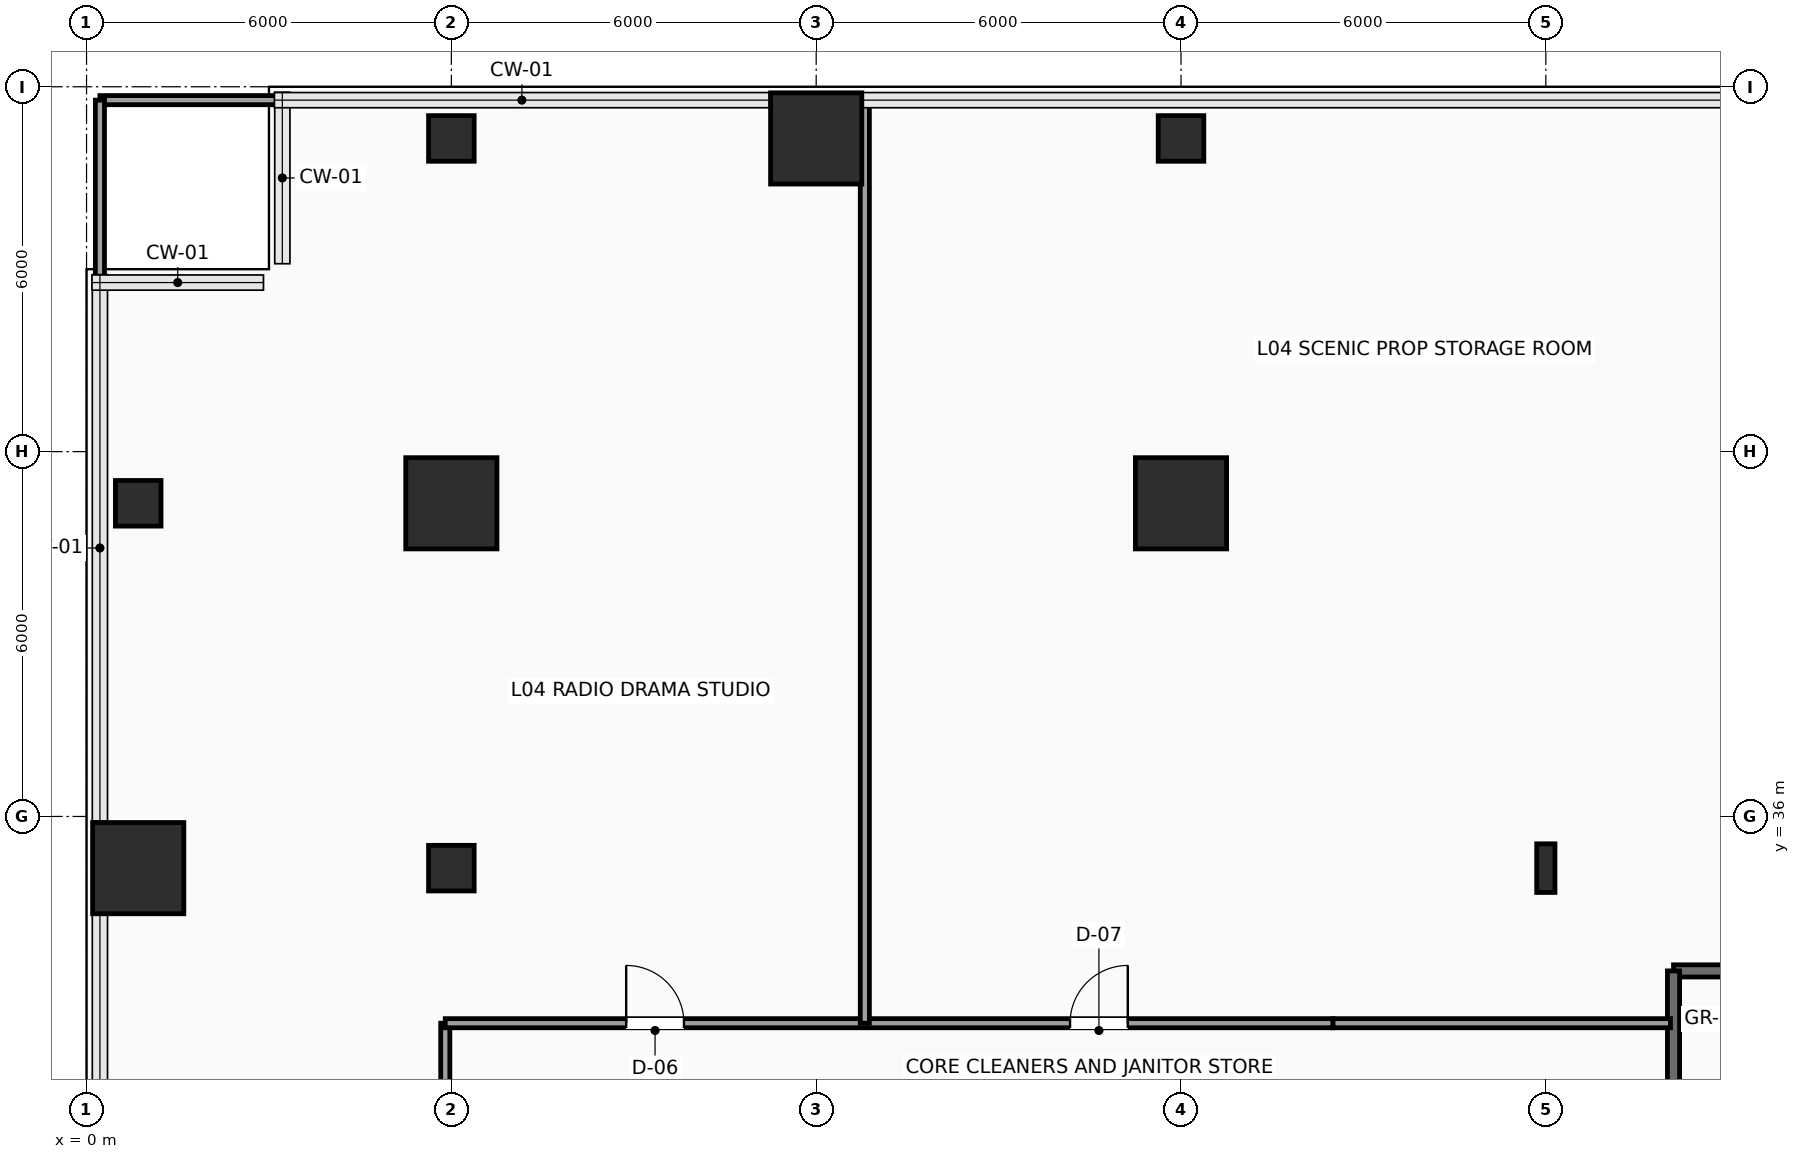
"""IFC4 building model, lengths in metres.
Left out: names, types, materials, properties, quantities, classifications, styles, units other than length and angle.
Written with IfcOpenShell. Run it as: python <this file> out.ifc"""

import sys

from ifc_helpers import new_model, si_unit, direction, frame, frame_2d, origin, origin_2d, place, context, subcontext, project, spatial, rectangle, hollow_rectangle, i_section, extrude, element, fill, save


model = new_model("IFC4")
c1 = context("Model", 3, precision=1e-05, world=origin(), true_north=direction((0.0, 1.0)))
c2 = subcontext(c1, "Body", "Model", "MODEL_VIEW")
j1 = project(units=[si_unit("LENGTHUNIT", "METRE"), si_unit("PLANEANGLEUNIT", "RADIAN")], contexts=[c1])
p1 = place(None, origin())
s1 = spatial("IfcSite", under=j1, at=p1, CompositionType="ELEMENT")
p2 = place(p1, origin())
s2 = spatial("IfcBuilding", under=s1, at=p2, CompositionType="ELEMENT")
p3 = place(p2, frame((0.0, 0.0, 21.9)))
s3 = spatial("IfcBuildingStorey", under=s2, at=p3, CompositionType="ELEMENT", Elevation=21.9)
p4 = place(p3, frame((0.85, 35.15, 0.0), z_axis=(0.0, 0.0, 1.0), x_axis=(1.0, 0.0, 0.0)))
e1 = element("IfcColumn", 1, at=p4, inside=s3, PredefinedType="COLUMN", context=c2, shape_type="SweptSolid", body=[
    extrude(rectangle(XDim=1.5, YDim=1.5, at=origin_2d()), origin(), (0.0, 0.0, 1.0), 5.7),
])
p5 = place(p3, frame((0.85, 41.15, 0.0), z_axis=(0.0, 0.0, 1.0), x_axis=(1.0, 0.0, 0.0)))
e2 = element("IfcColumn", 2, at=p5, inside=s3, PredefinedType="COLUMN", context=c2, shape_type="SweptSolid", body=[
    extrude(hollow_rectangle(XDim=0.75, YDim=0.75, WallThickness=0.035, InnerFilletRadius=0.035, OuterFilletRadius=0.05, at=origin_2d()), origin(), (0.0, 0.0, 1.0), 5.7),
])
p6 = place(p3, frame((6.0, 35.15, 0.0), z_axis=(0.0, 0.0, 1.0), x_axis=(1.0, 0.0, 0.0)))
e3 = element("IfcColumn", 3, at=p6, inside=s3, PredefinedType="COLUMN", context=c2, shape_type="SweptSolid", body=[
    extrude(hollow_rectangle(XDim=0.75, YDim=0.75, WallThickness=0.035, InnerFilletRadius=0.035, OuterFilletRadius=0.05, at=origin_2d()), origin(), (0.0, 0.0, 1.0), 5.35),
])
p7 = place(p3, frame((6.0, 41.15, 0.0), z_axis=(0.0, 0.0, 1.0), x_axis=(1.0, 0.0, 0.0)))
e4 = element("IfcColumn", 4, at=p7, inside=s3, PredefinedType="COLUMN", context=c2, shape_type="SweptSolid", body=[
    extrude(rectangle(XDim=1.5, YDim=1.5, at=origin_2d()), origin(), (0.0, 0.0, 1.0), 5.35),
])
p8 = place(p3, frame((6.0, 47.15, 0.0), z_axis=(0.0, 0.0, 1.0), x_axis=(1.0, 0.0, 0.0)))
e5 = element("IfcColumn", 5, at=p8, inside=s3, PredefinedType="COLUMN", context=c2, shape_type="SweptSolid", body=[
    extrude(hollow_rectangle(XDim=0.75, YDim=0.75, WallThickness=0.035, InnerFilletRadius=0.035, OuterFilletRadius=0.05, at=origin_2d()), origin(), (0.0, 0.0, 1.0), 5.7),
])
p9 = place(p3, frame((12.0, 47.15, 0.0), z_axis=(0.0, 0.0, 1.0), x_axis=(1.0, 0.0, 0.0)))
e6 = element("IfcColumn", 6, at=p9, inside=s3, PredefinedType="COLUMN", context=c2, shape_type="SweptSolid", body=[
    extrude(rectangle(XDim=1.5, YDim=1.5, at=origin_2d()), origin(), (0.0, 0.0, 1.0), 5.7),
])
p10 = place(p3, frame((18.0, 41.15, 0.0), z_axis=(0.0, 0.0, 1.0), x_axis=(1.0, 0.0, 0.0)))
e7 = element("IfcColumn", 7, at=p10, inside=s3, PredefinedType="COLUMN", context=c2, shape_type="SweptSolid", body=[
    extrude(rectangle(XDim=1.5, YDim=1.5, at=origin_2d()), origin(), (0.0, 0.0, 1.0), 5.35),
])
p11 = place(p3, frame((18.0, 47.15, 0.0), z_axis=(0.0, 0.0, 1.0), x_axis=(1.0, 0.0, 0.0)))
e8 = element("IfcColumn", 8, at=p11, inside=s3, PredefinedType="COLUMN", context=c2, shape_type="SweptSolid", body=[
    extrude(hollow_rectangle(XDim=0.75, YDim=0.75, WallThickness=0.035, InnerFilletRadius=0.035, OuterFilletRadius=0.05, at=origin_2d()), origin(), (0.0, 0.0, 1.0), 5.7),
])
p12 = place(p3, frame((24.0, 35.15, 0.0), z_axis=(0.0, 0.0, 1.0), x_axis=(1.0, 0.0, 0.0)))
e9 = element("IfcColumn", 9, at=p12, inside=s3, PredefinedType="COLUMN", context=c2, shape_type="SweptSolid", body=[
    extrude(i_section(OverallWidth=0.3, OverallDepth=0.8, WebThickness=0.018, FlangeThickness=0.033, FilletRadius=0.03, at=origin_2d()), origin(), (0.0, 0.0, 1.0), 5.35),
])
p13 = place(p3, frame((26.1, 33.46, 0.0), z_axis=(0.0, 0.0, 1.0), x_axis=(1.0, 0.0, 0.0)))
e10 = element("IfcWall", 10, at=p13, inside=s3, PredefinedType="SHEAR", context=c2, shape_type="SweptSolid", body=[
    extrude(rectangle(XDim=9.05, YDim=0.2, at=frame_2d((4.525, 0.0))), origin(), (0.0, 0.0, 1.0), 5.35),
])
p14 = place(p3, frame((26.1, 29.7, 0.0), z_axis=(0.0, 0.0, 1.0), x_axis=(0.0, 1.0, 0.0)))
e11 = element("IfcWall", 11, at=p14, inside=s3, PredefinedType="SHEAR", context=c2, shape_type="SweptSolid", body=[
    extrude(rectangle(XDim=3.76, YDim=0.2, at=frame_2d((1.88, 0.0))), origin(), (0.0, 0.0, 1.0), 5.35),
])
p15 = place(p3, frame((5.9, 30.2, 0.0), z_axis=(0.0, 0.0, 1.0), x_axis=(0.0, 1.0, 0.0)))
e12 = element("IfcWall", 12, at=p15, inside=s3, PredefinedType="PARTITIONING", context=c2, shape_type="SweptSolid", body=[
    extrude(rectangle(XDim=2.4, YDim=0.15, at=frame_2d((1.2, 0.0))), origin(), (0.0, 0.0, 1.0), 4.442),
])
p16 = place(p3, frame((5.9, 32.6, 0.0), z_axis=(0.0, 0.0, 1.0), x_axis=(1.0, 0.0, 0.0)))
e13 = element("IfcWall", 13, at=p16, inside=s3, PredefinedType="PARTITIONING", context=c2, shape_type="SweptSolid", body=[
    extrude(rectangle(XDim=14.6, YDim=0.15, at=frame_2d((7.3, 0.0))), origin(), (0.0, 0.0, 1.0), 5.35),
])
p17 = place(p16, frame((2.975, 0.0, 0.0)))
e14 = element("IfcOpeningElement", 14, at=p17, cuts=e13, PredefinedType="OPENING", context=c2, shape_type="SweptSolid", body=[
    extrude(rectangle(XDim=0.95, YDim=2.15, at=frame_2d((0.475, 1.075))), frame((0.0, 0.085, 0.0), z_axis=(0.0, -1.0, 0.0), x_axis=(1.0, 0.0, 0.0)), (0.0, 0.0, 1.0), 0.17),
])
p18 = place(p16, frame((10.275, 0.0, 0.0)))
e15 = element("IfcOpeningElement", 15, at=p18, cuts=e13, PredefinedType="OPENING", context=c2, shape_type="SweptSolid", body=[
    extrude(rectangle(XDim=0.95, YDim=2.15, at=frame_2d((0.475, 1.075))), frame((0.0, 0.085, 0.0), z_axis=(0.0, -1.0, 0.0), x_axis=(1.0, 0.0, 0.0)), (0.0, 0.0, 1.0), 0.17),
])
p19 = place(p3, frame((20.5, 32.6, 0.0), z_axis=(0.0, 0.0, 1.0), x_axis=(1.0, 0.0, 0.0)))
e16 = element("IfcWall", 16, at=p19, inside=s3, PredefinedType="PARTITIONING", context=c2, shape_type="SweptSolid", body=[
    extrude(rectangle(XDim=5.55, YDim=0.15, at=frame_2d((2.775, 0.0))), origin(), (0.0, 0.0, 1.0), 5.35),
])
p20 = place(p3, frame((0.22, 47.78, 0.0), z_axis=(0.0, 0.0, 1.0), x_axis=(1.0, 0.0, 0.0)))
e17 = element("IfcWall", 17, at=p20, inside=s3, PredefinedType="PARTITIONING", context=c2, shape_type="SweptSolid", body=[
    extrude(rectangle(XDim=12.58, YDim=0.15, at=frame_2d((6.29, 0.0))), origin(), (0.0, 0.0, 1.0), 5.35),
])
for number, where, z_axis, x_axis in (
    (18, (0.22, 32.6, 0.0), (0.0, 0.0, 1.0), (0.0, 1.0, 0.0)),
    (19, (12.8, 32.6, 0.0), (0.0, 0.0, 1.0), (0.0, 1.0, 0.0)),
):
    element("IfcWall", number, at=place(p3, frame(where, z_axis=z_axis, x_axis=x_axis)), inside=s3, PredefinedType="PARTITIONING", context=c2, shape_type="SweptSolid", body=[
        extrude(rectangle(XDim=15.18, YDim=0.15, at=frame_2d((7.59, 0.0))), origin(), (0.0, 0.0, 1.0), 5.35),
    ])
p21 = place(p17, origin())
e20 = element("IfcDoor", 20, at=p21, inside=s3, OperationType="SINGLE_SWING_LEFT", PredefinedType="DOOR", context=c2, shape_type="SweptSolid", body=[
    extrude(rectangle(XDim=0.95, YDim=2.15, at=frame_2d((0.475, 1.075))), frame((0.0, 0.025, 0.0), z_axis=(0.0, -1.0, 0.0), x_axis=(1.0, 0.0, 0.0)), (0.0, 0.0, 1.0), 0.05),
])
fill(e14, e20)
p22 = place(p18, origin())
e21 = element("IfcDoor", 21, at=p22, inside=s3, OperationType="SINGLE_SWING_RIGHT", PredefinedType="DOOR", context=c2, shape_type="SweptSolid", body=[
    extrude(rectangle(XDim=0.95, YDim=2.15, at=frame_2d((0.475, 1.075))), frame((0.0, 0.025, 0.0), z_axis=(0.0, -1.0, 0.0), x_axis=(1.0, 0.0, 0.0)), (0.0, 0.0, 1.0), 0.05),
])
fill(e15, e21)
save(model, sys.argv[1])
